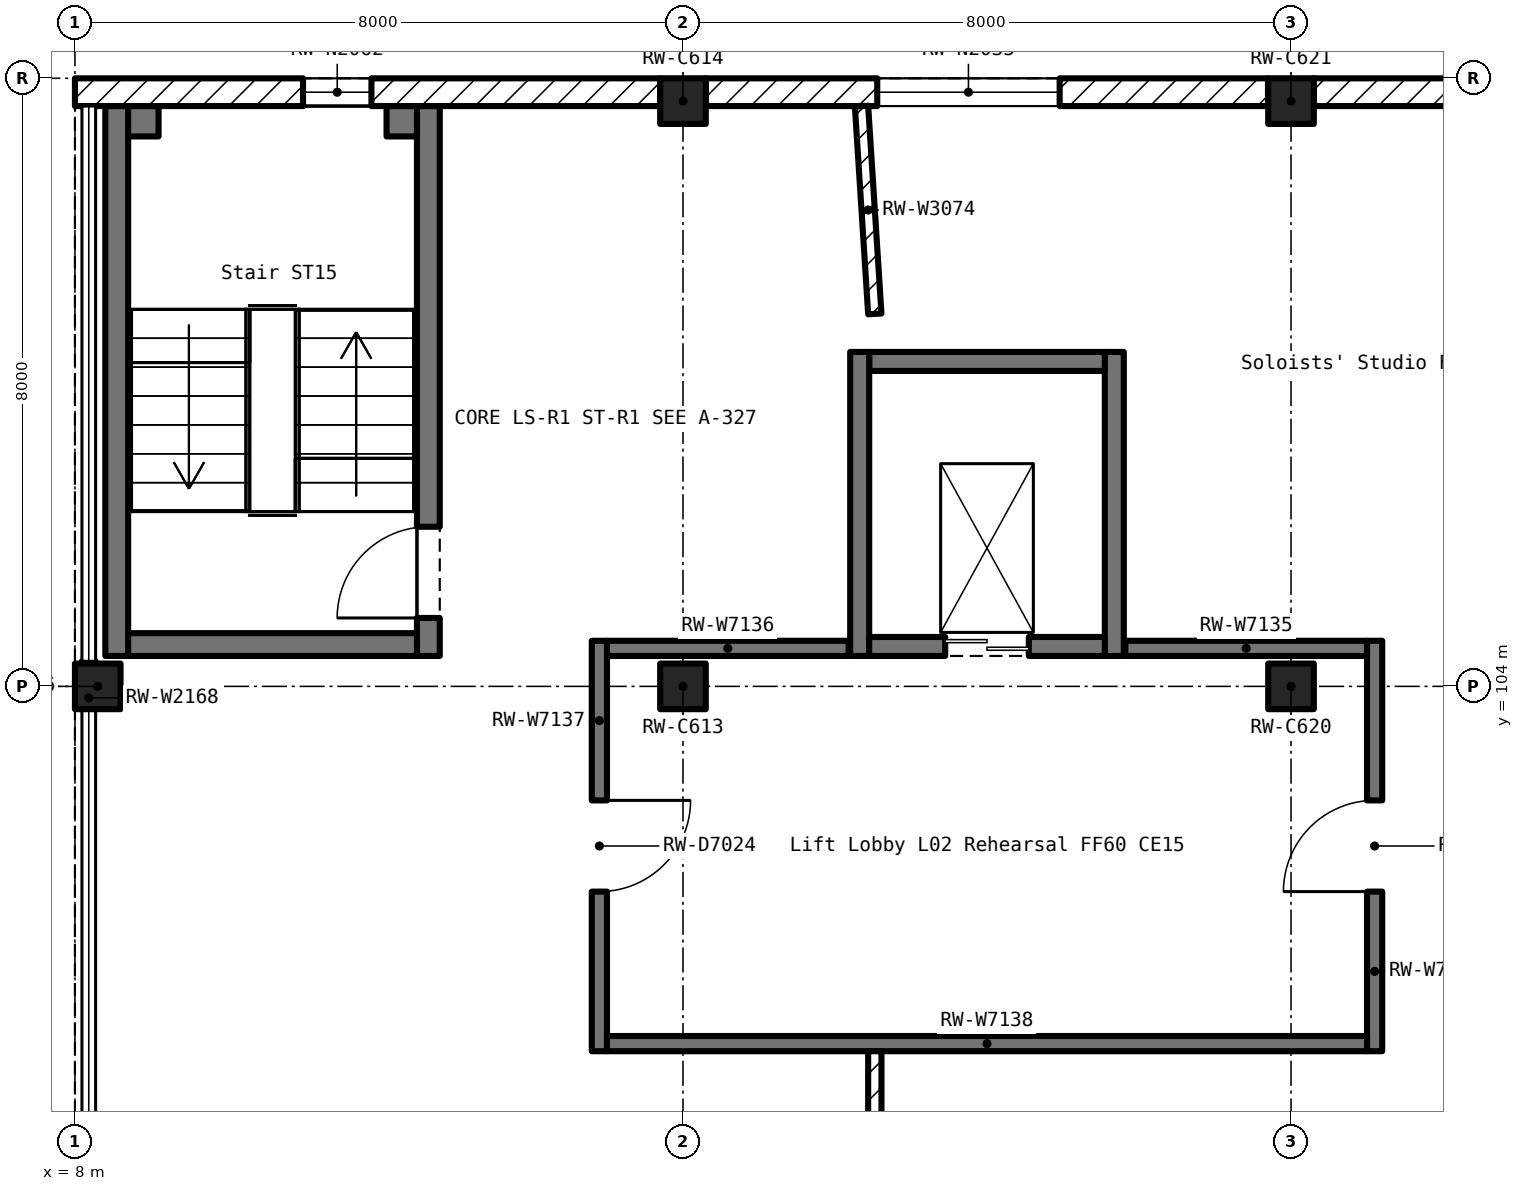
"""IFC4 building model, lengths in metres.
Left out: names, types, materials, properties, quantities, classifications, styles, units other than length and angle.
Written with IfcOpenShell. Run it as: python <this file> out.ifc"""

import sys

from ifc_helpers import new_model, si_unit, direction, frame, frame_2d, origin, origin_2d, place, context, subcontext, project, spatial, rectangle, extrude, element, fill, save


model = new_model("IFC4")
c1 = context("Model", 3, precision=1e-05, world=origin(), true_north=direction((0.0, 1.0)))
c2 = subcontext(c1, "Body", "Model", "MODEL_VIEW")
j1 = project(units=[si_unit("LENGTHUNIT", "METRE"), si_unit("PLANEANGLEUNIT", "RADIAN")], contexts=[c1])
p1 = place(None, origin())
s1 = spatial("IfcSite", under=j1, at=p1, CompositionType="ELEMENT")
p2 = place(p1, origin())
s2 = spatial("IfcBuilding", under=s1, at=p2, CompositionType="ELEMENT")
p3 = place(p2, frame((0.0, 0.0, 11.5)))
s3 = spatial("IfcBuildingStorey", under=s2, at=p3, CompositionType="ELEMENT", Elevation=11.5)
for number, where, z_axis, x_axis in (
    (1, (8.3, 104.0, 0.0), (0.0, 0.0, 1.0), (1.0, 0.0, 0.0)),
    (2, (16.0, 104.0, 0.0), (0.0, 0.0, 1.0), (1.0, 0.0, 0.0)),
    (3, (16.0, 111.7, 0.0), (0.0, 0.0, 1.0), (1.0, 0.0, 0.0)),
    (4, (24.0, 104.0, 0.0), (0.0, 0.0, 1.0), (1.0, 0.0, 0.0)),
    (5, (24.0, 111.7, 0.0), (0.0, 0.0, 1.0), (1.0, 0.0, 0.0)),
):
    element("IfcColumn", number, at=place(p3, frame(where, z_axis=z_axis, x_axis=x_axis)), inside=s3, PredefinedType="COLUMN", context=c2, shape_type="SweptSolid", body=[
        extrude(rectangle(XDim=0.6, YDim=0.6, at=origin_2d()), origin(), (0.0, 0.0, 1.0), 5.5),
    ])
p4 = place(p3, frame((30.817, 111.817, 0.0), z_axis=(0.0, 0.0, 1.0), x_axis=(-1.0, 0.0, 0.0)))
e6 = element("IfcWall", 6, at=p4, inside=s3, PredefinedType="SOLIDWALL", context=c2, shape_type="SweptSolid", body=[
    extrude(rectangle(XDim=6.517, YDim=0.365, at=frame_2d((3.258, 0.0))), origin(), (0.0, 0.0, 1.0), 4.55),
])
p5 = place(p4, frame((2.059, 0.0, 1.0)))
e7 = element("IfcOpeningElement", 7, at=p5, cuts=e6, PredefinedType="OPENING", context=c2, shape_type="SweptSolid", body=[
    extrude(rectangle(XDim=2.4, YDim=2.0, at=frame_2d((1.2, 1.0))), frame((0.0, 0.195, 0.0), z_axis=(0.0, -1.0, 0.0), x_axis=(1.0, 0.0, 0.0)), (0.0, 0.0, 1.0), 0.389),
])
p6 = place(p3, frame((23.697, 111.817, 0.0), z_axis=(0.0, 0.0, 1.0), x_axis=(-1.0, 0.0, 0.0)))
e8 = element("IfcWall", 8, at=p6, inside=s3, PredefinedType="SOLIDWALL", context=c2, shape_type="SweptSolid", body=[
    extrude(rectangle(XDim=7.397, YDim=0.365, at=frame_2d((3.698, 0.0))), origin(), (0.0, 0.0, 1.0), 4.55),
])
p7 = place(p6, frame((2.741, 0.0, 1.0)))
e9 = element("IfcOpeningElement", 9, at=p7, cuts=e8, PredefinedType="OPENING", context=c2, shape_type="SweptSolid", body=[
    extrude(rectangle(XDim=2.4, YDim=2.0, at=frame_2d((1.2, 1.0))), frame((0.0, 0.195, 0.0), z_axis=(0.0, -1.0, 0.0), x_axis=(1.0, 0.0, 0.0)), (0.0, 0.0, 1.0), 0.389),
])
p8 = place(p3, frame((15.701, 111.817, 0.0), z_axis=(0.0, 0.0, 1.0), x_axis=(-1.0, 0.0, 0.0)))
e10 = element("IfcWall", 10, at=p8, inside=s3, PredefinedType="SOLIDWALL", context=c2, shape_type="SweptSolid", body=[
    extrude(rectangle(XDim=7.701, YDim=0.365, at=frame_2d((3.851, 0.0))), origin(), (0.0, 0.0, 1.0), 4.55),
])
p9 = place(p8, frame((3.8, 0.0, 1.0)))
e11 = element("IfcOpeningElement", 11, at=p9, cuts=e10, PredefinedType="OPENING", context=c2, shape_type="SweptSolid", body=[
    extrude(rectangle(XDim=0.9, YDim=2.0, at=frame_2d((0.45, 1.0))), frame((0.0, 0.195, 0.0), z_axis=(0.0, -1.0, 0.0), x_axis=(1.0, 0.0, 0.0)), (0.0, 0.0, 1.0), 0.389),
])
p10 = place(p3, frame((12.65, 104.4, 0.0), z_axis=(0.0, 0.0, 1.0), x_axis=(0.0, 1.0, 0.0)))
e12 = element("IfcWall", 12, at=p10, inside=s3, PredefinedType="SOLIDWALL", context=c2, shape_type="SweptSolid", body=[
    extrude(rectangle(XDim=7.235, YDim=0.3, at=frame_2d((3.618, 0.0))), origin(), (0.0, 0.0, 1.0), 5.5),
])
p11 = place(p10, frame((0.5, 0.0, 0.0)))
e13 = element("IfcOpeningElement", 13, at=p11, cuts=e12, PredefinedType="OPENING", context=c2, shape_type="SweptSolid", body=[
    extrude(rectangle(XDim=1.2, YDim=2.1, at=frame_2d((0.6, 1.05))), frame((0.0, 0.162, 0.0), z_axis=(0.0, -1.0, 0.0), x_axis=(1.0, 0.0, 0.0)), (0.0, 0.0, 1.0), 0.324),
])
p12 = place(p3, frame((8.55, 111.635, 0.0), z_axis=(0.0, 0.0, 1.0), x_axis=(0.0, -1.0, 0.0)))
e14 = element("IfcWall", 14, at=p12, inside=s3, PredefinedType="SOLIDWALL", context=c2, shape_type="SweptSolid", body=[
    extrude(rectangle(XDim=7.235, YDim=0.3, at=frame_2d((3.618, 0.0))), origin(), (0.0, 0.0, 1.0), 5.5),
])
p13 = place(p3, frame((8.7, 104.55, 0.0), z_axis=(0.0, 0.0, 1.0), x_axis=(1.0, 0.0, 0.0)))
e15 = element("IfcWall", 15, at=p13, inside=s3, PredefinedType="SOLIDWALL", context=c2, shape_type="SweptSolid", body=[
    extrude(rectangle(XDim=3.8, YDim=0.3, at=frame_2d((1.9, 0.0))), origin(), (0.0, 0.0, 1.0), 5.5),
])
p14 = place(p3, frame((12.5, 111.435, 0.0), z_axis=(0.0, 0.0, 1.0), x_axis=(-1.0, 0.0, 0.0)))
e16 = element("IfcWall", 16, at=p14, inside=s3, PredefinedType="SOLIDWALL", context=c2, shape_type="SweptSolid", body=[
    extrude(rectangle(XDim=0.4, YDim=0.4, at=frame_2d((0.2, 0.0))), origin(), (0.0, 0.0, 1.0), 5.5),
])
p15 = place(p3, frame((9.1, 111.435, 0.0), z_axis=(0.0, 0.0, 1.0), x_axis=(-1.0, 0.0, 0.0)))
e17 = element("IfcWall", 17, at=p15, inside=s3, PredefinedType="SOLIDWALL", context=c2, shape_type="SweptSolid", body=[
    extrude(rectangle(XDim=0.4, YDim=0.4, at=frame_2d((0.2, 0.0))), origin(), (0.0, 0.0, 1.0), 5.5),
])
p16 = place(p3, frame((21.675, 104.4, 0.0), z_axis=(0.0, 0.0, 1.0), x_axis=(0.0, 1.0, 0.0)))
e18 = element("IfcWall", 18, at=p16, inside=s3, PredefinedType="SOLIDWALL", context=c2, shape_type="SweptSolid", body=[
    extrude(rectangle(XDim=4.0, YDim=0.25, at=frame_2d((2.0, 0.0))), origin(), (0.0, 0.0, 1.0), 5.5),
])
p17 = place(p3, frame((21.55, 108.275, 0.0), z_axis=(0.0, 0.0, 1.0), x_axis=(-1.0, 0.0, 0.0)))
e19 = element("IfcWall", 19, at=p17, inside=s3, PredefinedType="SOLIDWALL", context=c2, shape_type="SweptSolid", body=[
    extrude(rectangle(XDim=3.1, YDim=0.25, at=frame_2d((1.55, 0.0))), origin(), (0.0, 0.0, 1.0), 5.5),
])
p18 = place(p3, frame((18.325, 108.4, 0.0), z_axis=(0.0, 0.0, 1.0), x_axis=(0.0, -1.0, 0.0)))
e20 = element("IfcWall", 20, at=p18, inside=s3, PredefinedType="SOLIDWALL", context=c2, shape_type="SweptSolid", body=[
    extrude(rectangle(XDim=4.0, YDim=0.25, at=frame_2d((2.0, 0.0))), origin(), (0.0, 0.0, 1.0), 5.5),
])
p19 = place(p3, frame((18.45, 104.525, 0.0), z_axis=(0.0, 0.0, 1.0), x_axis=(1.0, 0.0, 0.0)))
e21 = element("IfcWall", 21, at=p19, inside=s3, PredefinedType="SOLIDWALL", context=c2, shape_type="SweptSolid", body=[
    extrude(rectangle(XDim=3.1, YDim=0.25, at=frame_2d((1.55, 0.0))), origin(), (0.0, 0.0, 1.0), 5.5),
])
p20 = place(p19, frame((1.0, 0.0, 0.0)))
e22 = element("IfcOpeningElement", 22, at=p20, cuts=e21, PredefinedType="OPENING", context=c2, shape_type="SweptSolid", body=[
    extrude(rectangle(XDim=1.1, YDim=2.1, at=frame_2d((0.55, 1.05))), frame((0.0, 0.137, 0.0), z_axis=(0.0, -1.0, 0.0), x_axis=(1.0, 0.0, 0.0)), (0.0, 0.0, 1.0), 0.274),
])
p21 = place(p3, frame((25.1, 99.2, 0.0), z_axis=(0.0, 0.0, 1.0), x_axis=(0.0, 1.0, 0.0)))
e23 = element("IfcWall", 23, at=p21, inside=s3, PredefinedType="PARTITIONING", context=c2, shape_type="SweptSolid", body=[
    extrude(rectangle(XDim=5.4, YDim=0.2, at=frame_2d((2.7, 0.0))), origin(), (0.0, 0.0, 1.0), 5.35),
])
p22 = place(p21, frame((2.1, 0.0, 0.0)))
e24 = element("IfcOpeningElement", 24, at=p22, cuts=e23, PredefinedType="OPENING", context=c2, shape_type="SweptSolid", body=[
    extrude(rectangle(XDim=1.2, YDim=2.1, at=frame_2d((0.6, 1.05))), frame((0.0, 0.112, 0.0), z_axis=(0.0, -1.0, 0.0), x_axis=(1.0, 0.0, 0.0)), (0.0, 0.0, 1.0), 0.224),
])
for number, where, z_axis, x_axis in (
    (25, (25.0, 104.5, 0.0), (0.0, 0.0, 1.0), (-1.0, 0.0, 0.0)),
    (26, (18.18, 104.5, 0.0), (0.0, 0.0, 1.0), (-1.0, 0.0, 0.0)),
):
    element("IfcWall", number, at=place(p3, frame(where, z_axis=z_axis, x_axis=x_axis)), inside=s3, PredefinedType="PARTITIONING", context=c2, shape_type="SweptSolid", body=[
        extrude(rectangle(XDim=3.18, YDim=0.2, at=frame_2d((1.59, 0.0))), origin(), (0.0, 0.0, 1.0), 5.35),
    ])
p23 = place(p3, frame((14.9, 104.6, 0.0), z_axis=(0.0, 0.0, 1.0), x_axis=(0.0, -1.0, 0.0)))
e27 = element("IfcWall", 27, at=p23, inside=s3, PredefinedType="PARTITIONING", context=c2, shape_type="SweptSolid", body=[
    extrude(rectangle(XDim=5.4, YDim=0.2, at=frame_2d((2.7, 0.0))), origin(), (0.0, 0.0, 1.0), 5.35),
])
p24 = place(p23, frame((2.1, 0.0, 0.0)))
e28 = element("IfcOpeningElement", 28, at=p24, cuts=e27, PredefinedType="OPENING", context=c2, shape_type="SweptSolid", body=[
    extrude(rectangle(XDim=1.2, YDim=2.1, at=frame_2d((0.6, 1.05))), frame((0.0, 0.112, 0.0), z_axis=(0.0, -1.0, 0.0), x_axis=(1.0, 0.0, 0.0)), (0.0, 0.0, 1.0), 0.224),
])
p25 = place(p3, frame((15.0, 99.3, 0.0), z_axis=(0.0, 0.0, 1.0), x_axis=(1.0, 0.0, 0.0)))
e29 = element("IfcWall", 29, at=p25, inside=s3, PredefinedType="PARTITIONING", context=c2, shape_type="SweptSolid", body=[
    extrude(rectangle(XDim=10.0, YDim=0.2, at=frame_2d((5.0, 0.0))), origin(), (0.0, 0.0, 1.0), 5.35),
])
p26 = place(p3, frame((18.524, 99.2, 0.0), z_axis=(0.0, 0.0, 1.0), x_axis=(0.0, -1.0, 0.0)))
e30 = element("IfcWall", 30, at=p26, inside=s3, PredefinedType="PARTITIONING", context=c2, shape_type="SweptSolid", body=[
    extrude(rectangle(XDim=8.912, YDim=0.175, at=frame_2d((4.456, 0.0))), origin(), (0.0, 0.0, 1.0), 4.45),
])
p27 = place(p3, frame((18.349, 111.634, 0.0), z_axis=(0.0, 0.0, 1.0), x_axis=(0.063804010447, -0.997962448317, 0.0)))
e31 = element("IfcWall", 31, at=p27, inside=s3, PredefinedType="PARTITIONING", context=c2, shape_type="SweptSolid", body=[
    extrude(rectangle(XDim=2.74, YDim=0.175, at=frame_2d((1.37, 0.0))), origin(), (0.0, 0.0, 1.0), 4.45),
])
p28 = place(p3, frame((8.182, 104.33, 0.0), z_axis=(0.0, 0.0, 1.0), x_axis=(0.0, -1.0, 0.0)))
e32 = element("IfcWall", 32, at=p28, inside=s3, PredefinedType="SOLIDWALL", context=c2, shape_type="SweptSolid", body=[
    extrude(rectangle(XDim=0.305, YDim=0.18, at=frame_2d((0.153, 0.0))), origin(), (0.0, 0.0, 1.0), 3.7),
])
p29 = place(p3, frame((8.182, 103.696, 0.0), z_axis=(0.0, 0.0, 1.0), x_axis=(0.0, 1.0, 0.0)))
e33 = element("IfcWall", 33, at=p29, inside=s3, PredefinedType="SOLIDWALL", context=c2, shape_type="SweptSolid", body=[
    extrude(rectangle(XDim=0.305, YDim=0.18, at=frame_2d((0.152, 0.0))), origin(), (0.0, 0.0, 1.0), 3.7),
])
p30 = place(p7, origin())
e34 = element("IfcWindow", 34, at=p30, inside=s3, PartitioningType="DOUBLE_PANEL_VERTICAL", PredefinedType="WINDOW", context=c2, shape_type="SweptSolid", body=[
    extrude(rectangle(XDim=2.4, YDim=2.0, at=frame_2d((1.2, 1.0))), frame((0.0, 0.03, 0.0), z_axis=(0.0, -1.0, 0.0), x_axis=(1.0, 0.0, 0.0)), (0.0, 0.0, 1.0), 0.06),
])
fill(e9, e34)
p31 = place(p11, origin())
e35 = element("IfcDoor", 35, at=p31, inside=s3, OperationType="SINGLE_SWING_LEFT", PredefinedType="DOOR", context=c2, shape_type="SweptSolid", body=[
    extrude(rectangle(XDim=1.2, YDim=2.1, at=frame_2d((0.6, 1.05))), frame((0.0, 0.025, 0.0), z_axis=(0.0, -1.0, 0.0), x_axis=(1.0, 0.0, 0.0)), (0.0, 0.0, 1.0), 0.05),
])
fill(e13, e35)
p32 = place(p20, origin())
e36 = element("IfcDoor", 36, at=p32, inside=s3, OperationType="DOUBLE_DOOR_SLIDING", PredefinedType="DOOR", context=c2, shape_type="SweptSolid", body=[
    extrude(rectangle(XDim=1.1, YDim=2.1, at=frame_2d((0.55, 1.05))), frame((0.0, 0.025, 0.0), z_axis=(0.0, -1.0, 0.0), x_axis=(1.0, 0.0, 0.0)), (0.0, 0.0, 1.0), 0.05),
])
fill(e22, e36)
p33 = place(p22, origin())
e37 = element("IfcDoor", 37, at=p33, inside=s3, OperationType="SINGLE_SWING_LEFT", PredefinedType="DOOR", context=c2, shape_type="SweptSolid", body=[
    extrude(rectangle(XDim=1.2, YDim=2.1, at=frame_2d((0.6, 1.05))), frame((0.0, 0.025, 0.0), z_axis=(0.0, -1.0, 0.0), x_axis=(1.0, 0.0, 0.0)), (0.0, 0.0, 1.0), 0.05),
])
fill(e24, e37)
p34 = place(p24, origin())
e38 = element("IfcDoor", 38, at=p34, inside=s3, OperationType="SINGLE_SWING_LEFT", PredefinedType="DOOR", context=c2, shape_type="SweptSolid", body=[
    extrude(rectangle(XDim=1.2, YDim=2.1, at=frame_2d((0.6, 1.05))), frame((0.0, 0.025, 0.0), z_axis=(0.0, -1.0, 0.0), x_axis=(1.0, 0.0, 0.0)), (0.0, 0.0, 1.0), 0.05),
])
fill(e28, e38)
p35 = place(p9, origin())
e39 = element("IfcWindow", 39, at=p35, inside=s3, PartitioningType="SINGLE_PANEL", PredefinedType="WINDOW", context=c2, shape_type="SweptSolid", body=[
    extrude(rectangle(XDim=0.9, YDim=2.0, at=frame_2d((0.45, 1.0))), frame((0.0, 0.03, 0.0), z_axis=(0.0, -1.0, 0.0), x_axis=(1.0, 0.0, 0.0)), (0.0, 0.0, 1.0), 0.06),
])
fill(e11, e39)
save(model, sys.argv[1])
